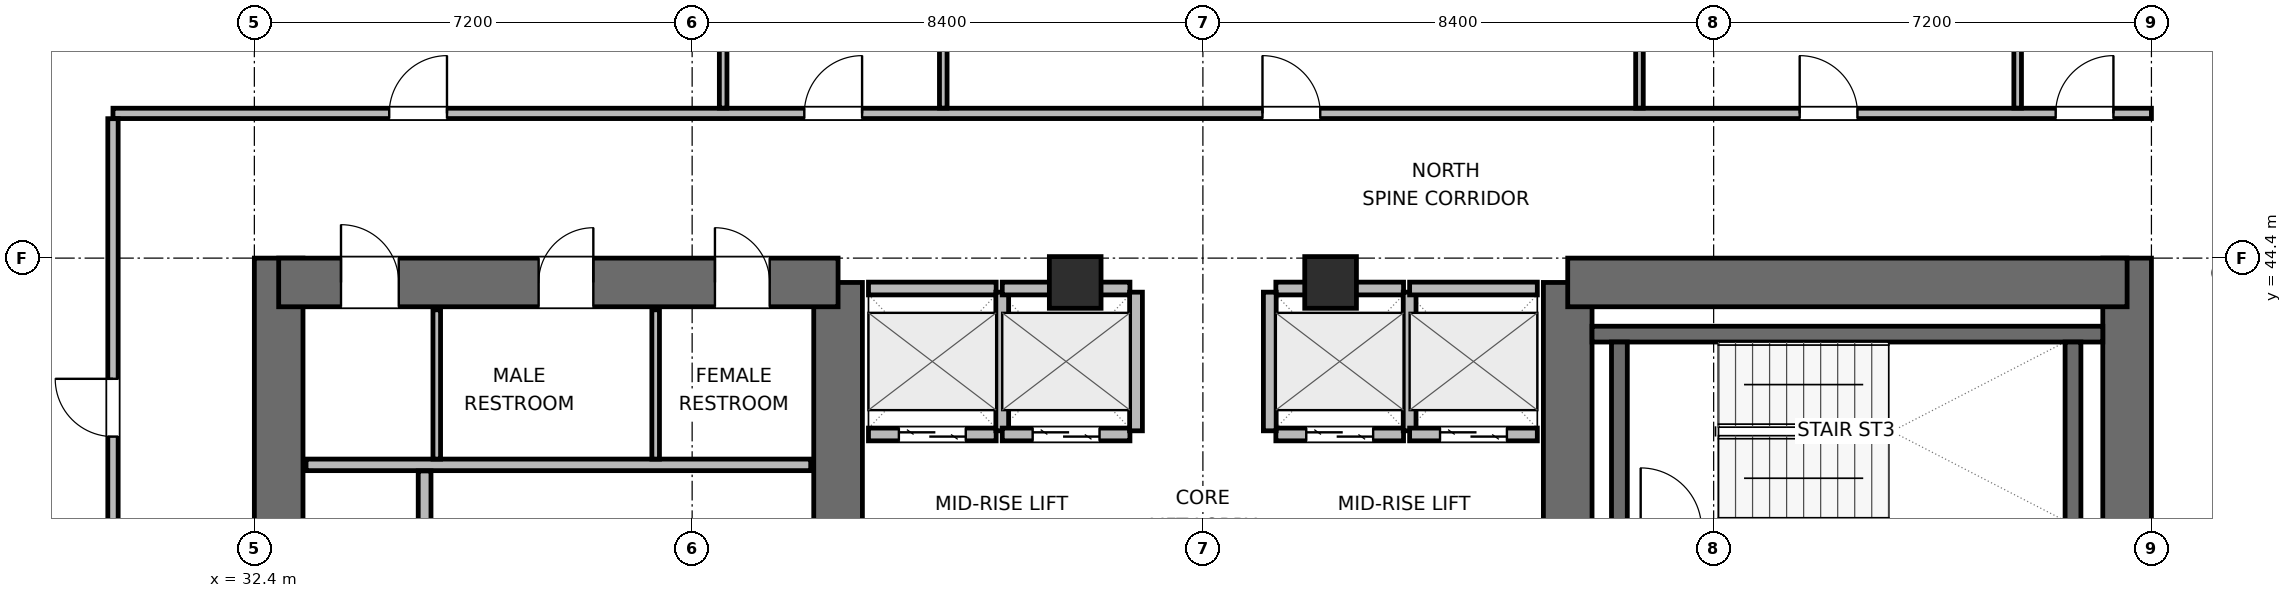
"""IFC4 building model, lengths in metres.
Left out: names, types, materials, properties, quantities, classifications, styles, units other than length and angle.
Written with IfcOpenShell. Run it as: python <this file> out.ifc"""

import sys

from ifc_helpers import new_model, si_unit, direction, frame, frame_2d, origin, origin_2d, place, context, subcontext, project, spatial, rectangle, extrude, element, fill, save


model = new_model("IFC4")
c1 = context("Model", 3, precision=1e-05, world=origin(), true_north=direction((0.0, 1.0)))
c2 = subcontext(c1, "Body", "Model", "MODEL_VIEW")
j1 = project(units=[si_unit("LENGTHUNIT", "METRE"), si_unit("PLANEANGLEUNIT", "RADIAN")], contexts=[c1])
p1 = place(None, origin())
s1 = spatial("IfcSite", under=j1, at=p1, CompositionType="ELEMENT")
p2 = place(p1, origin())
s2 = spatial("IfcBuilding", under=s1, at=p2, CompositionType="ELEMENT")
p3 = place(p2, frame((0.0, 0.0, 154.5)))
s3 = spatial("IfcBuildingStorey", under=s2, at=p3, CompositionType="ELEMENT", Elevation=154.5)
p4 = place(p3, frame((32.8, 27.6, 0.0), z_axis=(0.0, 0.0, 1.0), x_axis=(0.0, 1.0, 0.0)))
e1 = element("IfcWall", 1, at=p4, inside=s3, PredefinedType="SHEAR", context=c2, shape_type="SweptSolid", body=[
    extrude(rectangle(XDim=16.8, YDim=0.8, at=frame_2d((8.4, 0.0))), origin(), (0.0, 0.0, 1.0), 3.9),
])
p5 = place(p3, frame((42.0, 37.8, 0.0), z_axis=(0.0, 0.0, 1.0), x_axis=(0.0, 1.0, 0.0)))
e2 = element("IfcWall", 2, at=p5, inside=s3, PredefinedType="SHEAR", context=c2, shape_type="SweptSolid", body=[
    extrude(rectangle(XDim=6.2, YDim=0.8, at=frame_2d((3.1, 0.0))), origin(), (0.0, 0.0, 1.0), 3.9),
])
p6 = place(p3, frame((32.8, 44.0, 0.0), z_axis=(0.0, 0.0, 1.0), x_axis=(1.0, 0.0, 0.0)))
e3 = element("IfcWall", 3, at=p6, inside=s3, PredefinedType="SHEAR", context=c2, shape_type="SweptSolid", body=[
    extrude(rectangle(XDim=9.2, YDim=0.8, at=frame_2d((4.6, 0.0))), origin(), (0.0, 0.0, 1.0), 3.9),
])
p7 = place(p6, frame((1.025, 0.0, 0.0)))
e4 = element("IfcOpeningElement", 4, at=p7, cuts=e3, PredefinedType="OPENING", context=c2, shape_type="SweptSolid", body=[
    extrude(rectangle(XDim=0.95, YDim=2.04, at=frame_2d((0.475, 1.02))), frame((0.0, 0.41, 0.0), z_axis=(0.0, -1.0, 0.0), x_axis=(1.0, 0.0, 0.0)), (0.0, 0.0, 1.0), 0.82),
])
p8 = place(p6, frame((4.275, 0.0, 0.0)))
e5 = element("IfcOpeningElement", 5, at=p8, cuts=e3, PredefinedType="OPENING", context=c2, shape_type="SweptSolid", body=[
    extrude(rectangle(XDim=0.9, YDim=2.02, at=frame_2d((0.45, 1.01))), frame((0.0, 0.41, 0.0), z_axis=(0.0, -1.0, 0.0), x_axis=(1.0, 0.0, 0.0)), (0.0, 0.0, 1.0), 0.82),
])
p9 = place(p6, frame((7.175, 0.0, 0.0)))
e6 = element("IfcOpeningElement", 6, at=p9, cuts=e3, PredefinedType="OPENING", context=c2, shape_type="SweptSolid", body=[
    extrude(rectangle(XDim=0.9, YDim=2.02, at=frame_2d((0.45, 1.01))), frame((0.0, 0.41, 0.0), z_axis=(0.0, -1.0, 0.0), x_axis=(1.0, 0.0, 0.0)), (0.0, 0.0, 1.0), 0.82),
])
p10 = place(p3, frame((54.0, 38.0, 0.0), z_axis=(0.0, 0.0, 1.0), x_axis=(0.0, 1.0, 0.0)))
e7 = element("IfcWall", 7, at=p10, inside=s3, PredefinedType="SHEAR", context=c2, shape_type="SweptSolid", body=[
    extrude(rectangle(XDim=6.0, YDim=0.8, at=frame_2d((3.0, 0.0))), origin(), (0.0, 0.0, 1.0), 3.9),
])
p11 = place(p3, frame((63.2, 27.6, 0.0), z_axis=(0.0, 0.0, 1.0), x_axis=(0.0, 1.0, 0.0)))
e8 = element("IfcWall", 8, at=p11, inside=s3, PredefinedType="SHEAR", context=c2, shape_type="SweptSolid", body=[
    extrude(rectangle(XDim=16.8, YDim=0.8, at=frame_2d((8.4, 0.0))), origin(), (0.0, 0.0, 1.0), 3.9),
])
p12 = place(p3, frame((54.0, 44.0, 0.0), z_axis=(0.0, 0.0, 1.0), x_axis=(1.0, 0.0, 0.0)))
e9 = element("IfcWall", 9, at=p12, inside=s3, PredefinedType="SHEAR", context=c2, shape_type="SweptSolid", body=[
    extrude(rectangle(XDim=9.2, YDim=0.8, at=frame_2d((4.6, 0.0))), origin(), (0.0, 0.0, 1.0), 3.9),
])
p13 = place(p3, frame((54.4, 43.15, 0.0), z_axis=(0.0, 0.0, 1.0), x_axis=(1.0, 0.0, 0.0)))
e10 = element("IfcWall", 10, at=p13, inside=s3, PredefinedType="SHEAR", context=c2, shape_type="SweptSolid", body=[
    extrude(rectangle(XDim=8.4, YDim=0.26, at=frame_2d((4.2, 0.0))), origin(), (0.0, 0.0, 1.0), 3.9),
])
for number, where, z_axis, x_axis in (
    (11, (54.85, 40.08, 0.0), (0.0, 0.0, 1.0), (0.0, 1.0, 0.0)),
    (12, (62.31, 40.08, 0.0), (0.0, 0.0, 1.0), (0.0, 1.0, 0.0)),
):
    element("IfcWall", number, at=place(p3, frame(where, z_axis=z_axis, x_axis=x_axis)), inside=s3, PredefinedType="SHEAR", context=c2, shape_type="SweptSolid", body=[
        extrude(rectangle(XDim=2.94, YDim=0.26, at=frame_2d((1.47, 0.0))), origin(), (0.0, 0.0, 1.0), 3.9),
    ])
for number, where, z_axis, x_axis in (
    (13, (45.9, 44.0, 0.0), (0.0, 0.0, 1.0), (1.0, 0.0, 0.0)),
    (14, (50.1, 44.0, 0.0), (0.0, 0.0, 1.0), (1.0, 0.0, 0.0)),
):
    element("IfcColumn", number, at=place(p3, frame(where, z_axis=z_axis, x_axis=x_axis)), inside=s3, PredefinedType="COLUMN", context=c2, shape_type="SweptSolid", body=[
        extrude(rectangle(XDim=0.85, YDim=0.85, at=origin_2d()), origin(), (0.0, 0.0, 1.0), 3.9),
    ])
p14 = place(p3, frame((33.25, 41.0, 0.0), z_axis=(0.0, 0.0, 1.0), x_axis=(1.0, 0.0, 0.0)))
e15 = element("IfcWall", 15, at=p14, inside=s3, PredefinedType="PLUMBINGWALL", context=c2, shape_type="SweptSolid", body=[
    extrude(rectangle(XDim=8.3, YDim=0.19, at=frame_2d((4.15, 0.0))), origin(), (0.0, 0.0, 1.0), 3.68),
])
for number, where, z_axis, x_axis in (
    (16, (35.4, 41.095, 0.0), (0.0, 0.0, 1.0), (0.0, 1.0, 0.0)),
    (17, (39.0, 41.095, 0.0), (0.0, 0.0, 1.0), (0.0, 1.0, 0.0)),
):
    element("IfcWall", number, at=place(p3, frame(where, z_axis=z_axis, x_axis=x_axis)), inside=s3, PredefinedType="PARTITIONING", context=c2, shape_type="SweptSolid", body=[
        extrude(rectangle(XDim=2.455, YDim=0.125, at=frame_2d((1.228, 0.0))), origin(), (0.0, 0.0, 1.0), 3.68),
    ])
p15 = place(p3, frame((35.2, 39.58, 0.0), z_axis=(0.0, 0.0, 1.0), x_axis=(0.0, 1.0, 0.0)))
e18 = element("IfcWall", 18, at=p15, inside=s3, PredefinedType="PARTITIONING", context=c2, shape_type="SweptSolid", body=[
    extrude(rectangle(XDim=1.32, YDim=0.21, at=frame_2d((0.66, 0.0))), origin(), (0.0, 0.0, 1.0), 3.68),
])
p16 = place(p3, frame((42.5, 41.5, 0.0), z_axis=(0.0, 0.0, 1.0), x_axis=(1.0, 0.0, 0.0)))
e19 = element("IfcWall", 19, at=p16, inside=s3, PredefinedType="PARTITIONING", context=c2, shape_type="SweptSolid", body=[
    extrude(rectangle(XDim=2.1, YDim=0.21, at=frame_2d((1.05, 0.0))), origin(), (0.0, 0.0, 1.0), 3.68),
])
p17 = place(p16, frame((0.5, 0.0, 0.0)))
e20 = element("IfcOpeningElement", 20, at=p17, cuts=e19, PredefinedType="OPENING", context=c2, shape_type="SweptSolid", body=[
    extrude(rectangle(XDim=1.1, YDim=2.04, at=frame_2d((0.55, 1.02))), frame((0.0, 0.115, 0.0), z_axis=(0.0, -1.0, 0.0), x_axis=(1.0, 0.0, 0.0)), (0.0, 0.0, 1.0), 0.23),
])
p18 = place(p3, frame((42.5, 43.9, 0.0), z_axis=(0.0, 0.0, 1.0), x_axis=(1.0, 0.0, 0.0)))
e21 = element("IfcWall", 21, at=p18, inside=s3, PredefinedType="PARTITIONING", context=c2, shape_type="SweptSolid", body=[
    extrude(rectangle(XDim=2.1, YDim=0.21, at=frame_2d((1.05, 0.0))), origin(), (0.0, 0.0, 1.0), 2.565),
])
p19 = place(p3, frame((44.7, 41.56, 0.0), z_axis=(0.0, 0.0, 1.0), x_axis=(0.0, 1.0, 0.0)))
e22 = element("IfcWall", 22, at=p19, inside=s3, PredefinedType="PARTITIONING", context=c2, shape_type="SweptSolid", body=[
    extrude(rectangle(XDim=2.28, YDim=0.21, at=frame_2d((1.14, 0.0))), origin(), (0.0, 0.0, 1.0), 3.68),
])
p20 = place(p3, frame((44.7, 41.5, 0.0), z_axis=(0.0, 0.0, 1.0), x_axis=(1.0, 0.0, 0.0)))
e23 = element("IfcWall", 23, at=p20, inside=s3, PredefinedType="PARTITIONING", context=c2, shape_type="SweptSolid", body=[
    extrude(rectangle(XDim=2.1, YDim=0.21, at=frame_2d((1.05, 0.0))), origin(), (0.0, 0.0, 1.0), 3.68),
])
p21 = place(p20, frame((0.5, 0.0, 0.0)))
e24 = element("IfcOpeningElement", 24, at=p21, cuts=e23, PredefinedType="OPENING", context=c2, shape_type="SweptSolid", body=[
    extrude(rectangle(XDim=1.1, YDim=2.04, at=frame_2d((0.55, 1.02))), frame((0.0, 0.115, 0.0), z_axis=(0.0, -1.0, 0.0), x_axis=(1.0, 0.0, 0.0)), (0.0, 0.0, 1.0), 0.23),
])
p22 = place(p3, frame((44.7, 43.9, 0.0), z_axis=(0.0, 0.0, 1.0), x_axis=(1.0, 0.0, 0.0)))
e25 = element("IfcWall", 25, at=p22, inside=s3, PredefinedType="PARTITIONING", context=c2, shape_type="SweptSolid", body=[
    extrude(rectangle(XDim=2.1, YDim=0.21, at=frame_2d((1.05, 0.0))), origin(), (0.0, 0.0, 1.0), 2.565),
])
p23 = place(p3, frame((46.9, 41.56, 0.0), z_axis=(0.0, 0.0, 1.0), x_axis=(0.0, 1.0, 0.0)))
e26 = element("IfcWall", 26, at=p23, inside=s3, PredefinedType="PARTITIONING", context=c2, shape_type="SweptSolid", body=[
    extrude(rectangle(XDim=2.28, YDim=0.21, at=frame_2d((1.14, 0.0))), origin(), (0.0, 0.0, 1.0), 3.68),
])
p24 = place(p3, frame((49.2, 41.5, 0.0), z_axis=(0.0, 0.0, 1.0), x_axis=(1.0, 0.0, 0.0)))
e27 = element("IfcWall", 27, at=p24, inside=s3, PredefinedType="PARTITIONING", context=c2, shape_type="SweptSolid", body=[
    extrude(rectangle(XDim=2.1, YDim=0.21, at=frame_2d((1.05, 0.0))), origin(), (0.0, 0.0, 1.0), 3.68),
])
p25 = place(p24, frame((0.5, 0.0, 0.0)))
e28 = element("IfcOpeningElement", 28, at=p25, cuts=e27, PredefinedType="OPENING", context=c2, shape_type="SweptSolid", body=[
    extrude(rectangle(XDim=1.1, YDim=2.04, at=frame_2d((0.55, 1.02))), frame((0.0, 0.115, 0.0), z_axis=(0.0, -1.0, 0.0), x_axis=(1.0, 0.0, 0.0)), (0.0, 0.0, 1.0), 0.23),
])
p26 = place(p3, frame((49.2, 43.9, 0.0), z_axis=(0.0, 0.0, 1.0), x_axis=(1.0, 0.0, 0.0)))
e29 = element("IfcWall", 29, at=p26, inside=s3, PredefinedType="PARTITIONING", context=c2, shape_type="SweptSolid", body=[
    extrude(rectangle(XDim=2.1, YDim=0.21, at=frame_2d((1.05, 0.0))), origin(), (0.0, 0.0, 1.0), 2.565),
])
for number, where, z_axis, x_axis in (
    (30, (49.1, 41.56, 0.0), (0.0, 0.0, 1.0), (0.0, 1.0, 0.0)),
    (31, (51.4, 41.56, 0.0), (0.0, 0.0, 1.0), (0.0, 1.0, 0.0)),
):
    element("IfcWall", number, at=place(p3, frame(where, z_axis=z_axis, x_axis=x_axis)), inside=s3, PredefinedType="PARTITIONING", context=c2, shape_type="SweptSolid", body=[
        extrude(rectangle(XDim=2.28, YDim=0.21, at=frame_2d((1.14, 0.0))), origin(), (0.0, 0.0, 1.0), 3.68),
    ])
p27 = place(p3, frame((51.4, 41.5, 0.0), z_axis=(0.0, 0.0, 1.0), x_axis=(1.0, 0.0, 0.0)))
e32 = element("IfcWall", 32, at=p27, inside=s3, PredefinedType="PARTITIONING", context=c2, shape_type="SweptSolid", body=[
    extrude(rectangle(XDim=2.1, YDim=0.21, at=frame_2d((1.05, 0.0))), origin(), (0.0, 0.0, 1.0), 3.68),
])
p28 = place(p27, frame((0.5, 0.0, 0.0)))
e33 = element("IfcOpeningElement", 33, at=p28, cuts=e32, PredefinedType="OPENING", context=c2, shape_type="SweptSolid", body=[
    extrude(rectangle(XDim=1.1, YDim=2.04, at=frame_2d((0.55, 1.02))), frame((0.0, 0.115, 0.0), z_axis=(0.0, -1.0, 0.0), x_axis=(1.0, 0.0, 0.0)), (0.0, 0.0, 1.0), 0.23),
])
p29 = place(p3, frame((51.4, 43.9, 0.0), z_axis=(0.0, 0.0, 1.0), x_axis=(1.0, 0.0, 0.0)))
e34 = element("IfcWall", 34, at=p29, inside=s3, PredefinedType="PARTITIONING", context=c2, shape_type="SweptSolid", body=[
    extrude(rectangle(XDim=2.1, YDim=0.21, at=frame_2d((1.05, 0.0))), origin(), (0.0, 0.0, 1.0), 2.565),
])
p30 = place(p3, frame((30.075, 46.78, 0.0), z_axis=(0.0, 0.0, 1.0), x_axis=(1.0, 0.0, 0.0)))
e35 = element("IfcWall", 35, at=p30, inside=s3, PredefinedType="PARTITIONING", context=c2, shape_type="SweptSolid", body=[
    extrude(rectangle(XDim=33.525, YDim=0.17, at=frame_2d((16.763, 0.0))), origin(), (0.0, 0.0, 1.0), 3.68),
])
p31 = place(p30, frame((4.543, 0.0, 0.0)))
e36 = element("IfcOpeningElement", 36, at=p31, cuts=e35, PredefinedType="OPENING", context=c2, shape_type="SweptSolid", body=[
    extrude(rectangle(XDim=0.95, YDim=2.04, at=frame_2d((0.475, 1.02))), frame((0.0, 0.095, 0.0), z_axis=(0.0, -1.0, 0.0), x_axis=(1.0, 0.0, 0.0)), (0.0, 0.0, 1.0), 0.19),
])
p32 = place(p30, frame((11.37, 0.0, 0.0)))
e37 = element("IfcOpeningElement", 37, at=p32, cuts=e35, PredefinedType="OPENING", context=c2, shape_type="SweptSolid", body=[
    extrude(rectangle(XDim=0.95, YDim=2.04, at=frame_2d((0.475, 1.02))), frame((0.0, 0.095, 0.0), z_axis=(0.0, -1.0, 0.0), x_axis=(1.0, 0.0, 0.0)), (0.0, 0.0, 1.0), 0.19),
])
p33 = place(p30, frame((18.905, 0.0, 0.0)))
e38 = element("IfcOpeningElement", 38, at=p33, cuts=e35, PredefinedType="OPENING", context=c2, shape_type="SweptSolid", body=[
    extrude(rectangle(XDim=0.95, YDim=2.04, at=frame_2d((0.475, 1.02))), frame((0.0, 0.095, 0.0), z_axis=(0.0, -1.0, 0.0), x_axis=(1.0, 0.0, 0.0)), (0.0, 0.0, 1.0), 0.19),
])
p34 = place(p30, frame((27.74, 0.0, 0.0)))
e39 = element("IfcOpeningElement", 39, at=p34, cuts=e35, PredefinedType="OPENING", context=c2, shape_type="SweptSolid", body=[
    extrude(rectangle(XDim=0.95, YDim=2.04, at=frame_2d((0.475, 1.02))), frame((0.0, 0.095, 0.0), z_axis=(0.0, -1.0, 0.0), x_axis=(1.0, 0.0, 0.0)), (0.0, 0.0, 1.0), 0.19),
])
p35 = place(p30, frame((31.95, 0.0, 0.0)))
e40 = element("IfcOpeningElement", 40, at=p35, cuts=e35, PredefinedType="OPENING", context=c2, shape_type="SweptSolid", body=[
    extrude(rectangle(XDim=0.95, YDim=2.04, at=frame_2d((0.475, 1.02))), frame((0.0, 0.095, 0.0), z_axis=(0.0, -1.0, 0.0), x_axis=(1.0, 0.0, 0.0)), (0.0, 0.0, 1.0), 0.19),
])
p36 = place(p3, frame((30.075, 37.1, 0.0), z_axis=(0.0, 0.0, 1.0), x_axis=(0.0, 1.0, 0.0)))
e41 = element("IfcWall", 41, at=p36, inside=s3, PredefinedType="PARTITIONING", context=c2, shape_type="SweptSolid", body=[
    extrude(rectangle(XDim=9.593, YDim=0.17, at=frame_2d((4.796, 0.0))), origin(), (0.0, 0.0, 1.0), 3.68),
])
p37 = place(p36, frame((4.365, 0.0, 0.0)))
e42 = element("IfcOpeningElement", 42, at=p37, cuts=e41, PredefinedType="OPENING", context=c2, shape_type="SweptSolid", body=[
    extrude(rectangle(XDim=0.95, YDim=2.04, at=frame_2d((0.475, 1.02))), frame((0.0, 0.095, 0.0), z_axis=(0.0, -1.0, 0.0), x_axis=(1.0, 0.0, 0.0)), (0.0, 0.0, 1.0), 0.19),
])
p38 = place(p3, frame((40.11, 46.867, 0.0), z_axis=(0.0, 0.0, 1.0), x_axis=(0.0, 1.0, 0.0)))
e43 = element("IfcWall", 43, at=p38, inside=s3, PredefinedType="PARTITIONING", context=c2, shape_type="SweptSolid", body=[
    extrude(rectangle(XDim=15.298, YDim=0.125, at=frame_2d((7.649, 0.0))), origin(), (0.0, 0.0, 1.0), 3.043),
])
p39 = place(p3, frame((43.73, 46.867, 0.0), z_axis=(0.0, 0.0, 1.0), x_axis=(0.0, 1.0, 0.0)))
e44 = element("IfcWall", 44, at=p39, inside=s3, PredefinedType="PARTITIONING", context=c2, shape_type="SweptSolid", body=[
    extrude(rectangle(XDim=13.766, YDim=0.125, at=frame_2d((6.883, 0.0))), origin(), (0.0, 0.0, 1.0), 3.043),
])
p40 = place(p3, frame((55.18, 46.867, 0.0), z_axis=(0.0, 0.0, 1.0), x_axis=(0.0, 1.0, 0.0)))
e45 = element("IfcWall", 45, at=p40, inside=s3, PredefinedType="PARTITIONING", context=c2, shape_type="SweptSolid", body=[
    extrude(rectangle(XDim=15.258, YDim=0.125, at=frame_2d((7.629, 0.0))), origin(), (0.0, 0.0, 1.0), 3.043),
])
p41 = place(p3, frame((61.4, 46.867, 0.0), z_axis=(0.0, 0.0, 1.0), x_axis=(0.0, 1.0, 0.0)))
e46 = element("IfcWall", 46, at=p41, inside=s3, PredefinedType="PARTITIONING", context=c2, shape_type="SweptSolid", body=[
    extrude(rectangle(XDim=15.258, YDim=0.125, at=frame_2d((7.629, 0.0))), origin(), (0.0, 0.0, 1.0), 3.68),
])
p42 = place(p17, origin())
e47 = element("IfcDoor", 47, at=p42, inside=s3, OperationType="DOUBLE_DOOR_SLIDING", PredefinedType="DOOR", context=c2, shape_type="SweptSolid", body=[
    extrude(rectangle(XDim=1.1, YDim=2.04, at=frame_2d((0.55, 1.02))), frame((0.0, 0.025, 0.0), z_axis=(0.0, -1.0, 0.0), x_axis=(1.0, 0.0, 0.0)), (0.0, 0.0, 1.0), 0.05),
])
fill(e20, e47)
p43 = place(p21, origin())
e48 = element("IfcDoor", 48, at=p43, inside=s3, OperationType="DOUBLE_DOOR_SLIDING", PredefinedType="DOOR", context=c2, shape_type="SweptSolid", body=[
    extrude(rectangle(XDim=1.1, YDim=2.04, at=frame_2d((0.55, 1.02))), frame((0.0, 0.025, 0.0), z_axis=(0.0, -1.0, 0.0), x_axis=(1.0, 0.0, 0.0)), (0.0, 0.0, 1.0), 0.05),
])
fill(e24, e48)
p44 = place(p25, origin())
e49 = element("IfcDoor", 49, at=p44, inside=s3, OperationType="DOUBLE_DOOR_SLIDING", PredefinedType="DOOR", context=c2, shape_type="SweptSolid", body=[
    extrude(rectangle(XDim=1.1, YDim=2.04, at=frame_2d((0.55, 1.02))), frame((0.0, 0.025, 0.0), z_axis=(0.0, -1.0, 0.0), x_axis=(1.0, 0.0, 0.0)), (0.0, 0.0, 1.0), 0.05),
])
fill(e28, e49)
p45 = place(p28, origin())
e50 = element("IfcDoor", 50, at=p45, inside=s3, OperationType="DOUBLE_DOOR_SLIDING", PredefinedType="DOOR", context=c2, shape_type="SweptSolid", body=[
    extrude(rectangle(XDim=1.1, YDim=2.04, at=frame_2d((0.55, 1.02))), frame((0.0, 0.025, 0.0), z_axis=(0.0, -1.0, 0.0), x_axis=(1.0, 0.0, 0.0)), (0.0, 0.0, 1.0), 0.05),
])
fill(e33, e50)
p46 = place(p7, origin())
e51 = element("IfcDoor", 51, at=p46, inside=s3, OperationType="SINGLE_SWING_LEFT", PredefinedType="DOOR", context=c2, shape_type="SweptSolid", body=[
    extrude(rectangle(XDim=0.95, YDim=2.04, at=frame_2d((0.475, 1.02))), frame((0.0, 0.025, 0.0), z_axis=(0.0, -1.0, 0.0), x_axis=(1.0, 0.0, 0.0)), (0.0, 0.0, 1.0), 0.05),
])
fill(e4, e51)
p47 = place(p8, origin())
e52 = element("IfcDoor", 52, at=p47, inside=s3, OperationType="SINGLE_SWING_RIGHT", PredefinedType="DOOR", context=c2, shape_type="SweptSolid", body=[
    extrude(rectangle(XDim=0.9, YDim=2.02, at=frame_2d((0.45, 1.01))), frame((0.0, 0.025, 0.0), z_axis=(0.0, -1.0, 0.0), x_axis=(1.0, 0.0, 0.0)), (0.0, 0.0, 1.0), 0.05),
])
fill(e5, e52)
p48 = place(p9, origin())
e53 = element("IfcDoor", 53, at=p48, inside=s3, OperationType="SINGLE_SWING_LEFT", PredefinedType="DOOR", context=c2, shape_type="SweptSolid", body=[
    extrude(rectangle(XDim=0.9, YDim=2.02, at=frame_2d((0.45, 1.01))), frame((0.0, 0.025, 0.0), z_axis=(0.0, -1.0, 0.0), x_axis=(1.0, 0.0, 0.0)), (0.0, 0.0, 1.0), 0.05),
])
fill(e6, e53)
p49 = place(p31, origin())
e54 = element("IfcDoor", 54, at=p49, inside=s3, OperationType="SINGLE_SWING_RIGHT", PredefinedType="DOOR", context=c2, shape_type="SweptSolid", body=[
    extrude(rectangle(XDim=0.95, YDim=2.04, at=frame_2d((0.475, 1.02))), frame((0.0, 0.025, 0.0), z_axis=(0.0, -1.0, 0.0), x_axis=(1.0, 0.0, 0.0)), (0.0, 0.0, 1.0), 0.05),
])
fill(e36, e54)
p50 = place(p32, origin())
e55 = element("IfcDoor", 55, at=p50, inside=s3, OperationType="SINGLE_SWING_RIGHT", PredefinedType="DOOR", context=c2, shape_type="SweptSolid", body=[
    extrude(rectangle(XDim=0.95, YDim=2.04, at=frame_2d((0.475, 1.02))), frame((0.0, 0.025, 0.0), z_axis=(0.0, -1.0, 0.0), x_axis=(1.0, 0.0, 0.0)), (0.0, 0.0, 1.0), 0.05),
])
fill(e37, e55)
p51 = place(p33, origin())
e56 = element("IfcDoor", 56, at=p51, inside=s3, OperationType="SINGLE_SWING_LEFT", PredefinedType="DOOR", context=c2, shape_type="SweptSolid", body=[
    extrude(rectangle(XDim=0.95, YDim=2.04, at=frame_2d((0.475, 1.02))), frame((0.0, 0.025, 0.0), z_axis=(0.0, -1.0, 0.0), x_axis=(1.0, 0.0, 0.0)), (0.0, 0.0, 1.0), 0.05),
])
fill(e38, e56)
p52 = place(p34, origin())
e57 = element("IfcDoor", 57, at=p52, inside=s3, OperationType="SINGLE_SWING_LEFT", PredefinedType="DOOR", context=c2, shape_type="SweptSolid", body=[
    extrude(rectangle(XDim=0.95, YDim=2.04, at=frame_2d((0.475, 1.02))), frame((0.0, 0.025, 0.0), z_axis=(0.0, -1.0, 0.0), x_axis=(1.0, 0.0, 0.0)), (0.0, 0.0, 1.0), 0.05),
])
fill(e39, e57)
p53 = place(p35, origin())
e58 = element("IfcDoor", 58, at=p53, inside=s3, OperationType="SINGLE_SWING_RIGHT", PredefinedType="DOOR", context=c2, shape_type="SweptSolid", body=[
    extrude(rectangle(XDim=0.95, YDim=2.04, at=frame_2d((0.475, 1.02))), frame((0.0, 0.025, 0.0), z_axis=(0.0, -1.0, 0.0), x_axis=(1.0, 0.0, 0.0)), (0.0, 0.0, 1.0), 0.05),
])
fill(e40, e58)
p54 = place(p37, origin())
e59 = element("IfcDoor", 59, at=p54, inside=s3, OperationType="SINGLE_SWING_RIGHT", PredefinedType="DOOR", context=c2, shape_type="SweptSolid", body=[
    extrude(rectangle(XDim=0.95, YDim=2.04, at=frame_2d((0.475, 1.02))), frame((0.0, 0.025, 0.0), z_axis=(0.0, -1.0, 0.0), x_axis=(1.0, 0.0, 0.0)), (0.0, 0.0, 1.0), 0.05),
])
fill(e42, e59)
save(model, sys.argv[1])
